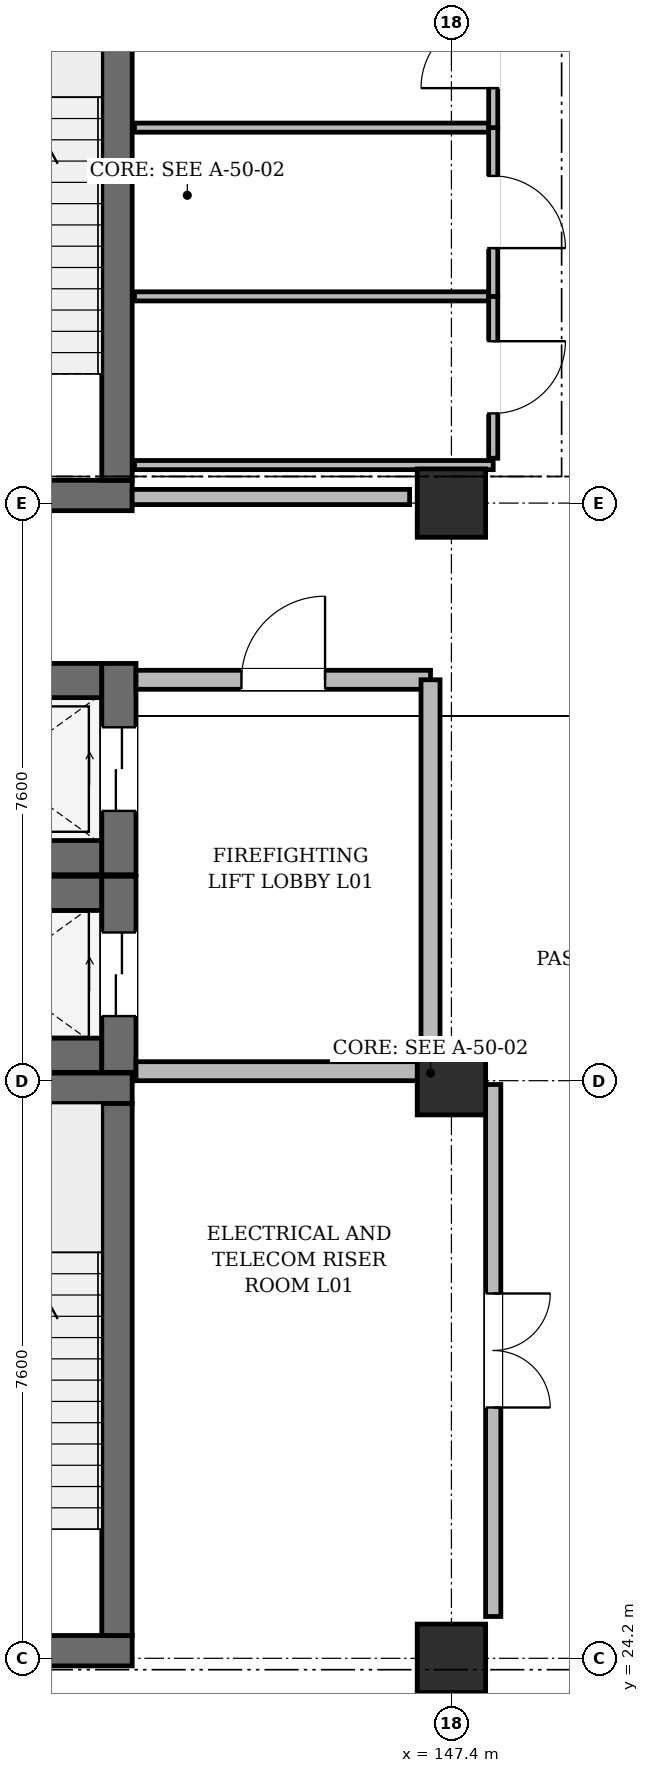
"""IFC4 building model, lengths in metres.
Left out: names, types, materials, properties, quantities, classifications, styles, units other than length and angle.
Written with IfcOpenShell. Run it as: python <this file> out.ifc"""

import sys

from ifc_helpers import new_model, si_unit, direction, frame, frame_2d, origin, origin_2d, place, context, subcontext, project, spatial, rectangle, extrude, element, fill, save


model = new_model("IFC4")
c1 = context("Model", 3, precision=1e-05, world=origin(), true_north=direction((0.0, 1.0)))
c2 = subcontext(c1, "Body", "Model", "MODEL_VIEW")
j1 = project(units=[si_unit("LENGTHUNIT", "METRE"), si_unit("PLANEANGLEUNIT", "RADIAN")], contexts=[c1])
p1 = place(None, origin())
s1 = spatial("IfcSite", under=j1, at=p1, CompositionType="ELEMENT")
p2 = place(p1, origin())
s2 = spatial("IfcBuilding", under=s1, at=p2, CompositionType="ELEMENT")
p3 = place(p2, frame((0.0, 0.0, 5.4)))
s3 = spatial("IfcBuildingStorey", under=s2, at=p3, CompositionType="ELEMENT", Elevation=5.4)
for number, where, z_axis, x_axis in (
    (1, (147.4, 24.2, 0.0), (0.0, 0.0, 1.0), (1.0, 0.0, 0.0)),
    (2, (147.4, 31.8, 0.0), (0.0, 0.0, 1.0), (1.0, 0.0, 0.0)),
    (3, (147.4, 39.4, 0.0), (0.0, 0.0, 1.0), (1.0, 0.0, 0.0)),
):
    element("IfcColumn", number, at=place(p3, frame(where, z_axis=z_axis, x_axis=x_axis)), inside=s3, PredefinedType="COLUMN", context=c2, shape_type="SweptSolid", body=[
        extrude(rectangle(XDim=0.9, YDim=0.9, at=origin_2d()), origin(), (0.0, 0.0, 1.0), 4.52),
    ])
p4 = place(p3, frame((139.4, 24.3, 0.0), z_axis=(0.0, 0.0, 1.0), x_axis=(1.0, 0.0, 0.0)))
e4 = element("IfcWall", 4, at=p4, inside=s3, PredefinedType="SHEAR", context=c2, shape_type="SweptSolid", body=[
    extrude(rectangle(XDim=3.8, YDim=0.4, at=frame_2d((1.9, 0.0))), origin(), (0.0, 0.0, 1.0), 4.52),
])
p5 = place(p4, frame((1.3, 0.0, 0.0)))
e5 = element("IfcOpeningElement", 5, at=p5, cuts=e4, PredefinedType="OPENING", context=c2, shape_type="SweptSolid", body=[
    extrude(rectangle(XDim=1.2, YDim=2.2, at=frame_2d((0.6, 1.1))), frame((0.0, 0.212, 0.0), z_axis=(0.0, -1.0, 0.0), x_axis=(1.0, 0.0, 0.0)), (0.0, 0.0, 1.0), 0.424),
])
p6 = place(p3, frame((139.4, 31.7, 0.0), z_axis=(0.0, 0.0, 1.0), x_axis=(1.0, 0.0, 0.0)))
e6 = element("IfcWall", 6, at=p6, inside=s3, PredefinedType="SHEAR", context=c2, shape_type="SweptSolid", body=[
    extrude(rectangle(XDim=3.8, YDim=0.4, at=frame_2d((1.9, 0.0))), origin(), (0.0, 0.0, 1.0), 4.52),
])
p7 = place(p3, frame((143.0, 24.5, 0.0), z_axis=(0.0, 0.0, 1.0), x_axis=(0.0, 1.0, 0.0)))
e7 = element("IfcWall", 7, at=p7, inside=s3, PredefinedType="SHEAR", context=c2, shape_type="SweptSolid", body=[
    extrude(rectangle(XDim=7.0, YDim=0.4, at=frame_2d((3.5, 0.0))), origin(), (0.0, 0.0, 1.0), 4.52),
])
p8 = place(p3, frame((139.4, 39.5, 0.0), z_axis=(0.0, 0.0, 1.0), x_axis=(1.0, 0.0, 0.0)))
e8 = element("IfcWall", 8, at=p8, inside=s3, PredefinedType="SHEAR", context=c2, shape_type="SweptSolid", body=[
    extrude(rectangle(XDim=3.8, YDim=0.4, at=frame_2d((1.9, 0.0))), origin(), (0.0, 0.0, 1.0), 4.52),
])
p9 = place(p8, frame((1.3, 0.0, 0.0)))
e9 = element("IfcOpeningElement", 9, at=p9, cuts=e8, PredefinedType="OPENING", context=c2, shape_type="SweptSolid", body=[
    extrude(rectangle(XDim=1.2, YDim=2.2, at=frame_2d((0.6, 1.1))), frame((0.0, 0.212, 0.0), z_axis=(0.0, -1.0, 0.0), x_axis=(1.0, 0.0, 0.0)), (0.0, 0.0, 1.0), 0.424),
])
p10 = place(p3, frame((143.0, 39.7, 0.0), z_axis=(0.0, 0.0, 1.0), x_axis=(0.0, 1.0, 0.0)))
e10 = element("IfcWall", 10, at=p10, inside=s3, PredefinedType="SHEAR", context=c2, shape_type="SweptSolid", body=[
    extrude(rectangle(XDim=7.0, YDim=0.4, at=frame_2d((3.5, 0.0))), origin(), (0.0, 0.0, 1.0), 4.52),
])
for number, where, z_axis, x_axis in (
    (11, (140.06, 32.135, 0.0), (0.0, 0.0, 1.0), (1.0, 0.0, 0.0)),
    (12, (140.06, 34.265, 0.0), (0.0, 0.0, 1.0), (1.0, 0.0, 0.0)),
):
    element("IfcWall", number, at=place(p3, frame(where, z_axis=z_axis, x_axis=x_axis)), inside=s3, PredefinedType="SHEAR", context=c2, shape_type="SweptSolid", body=[
        extrude(rectangle(XDim=2.74, YDim=0.45, at=frame_2d((1.37, 0.0))), origin(), (0.0, 0.0, 1.0), 4.52),
    ])
p11 = place(p3, frame((143.025, 31.91, 0.0), z_axis=(0.0, 0.0, 1.0), x_axis=(0.0, 1.0, 0.0)))
e13 = element("IfcWall", 13, at=p11, inside=s3, PredefinedType="SHEAR", context=c2, shape_type="SweptSolid", body=[
    extrude(rectangle(XDim=2.58, YDim=0.45, at=frame_2d((1.29, 0.0))), origin(), (0.0, 0.0, 1.0), 4.52),
])
p12 = place(p11, frame((0.74, 0.0, 0.0)))
e14 = element("IfcOpeningElement", 14, at=p12, cuts=e13, PredefinedType="OPENING", context=c2, shape_type="SweptSolid", body=[
    extrude(rectangle(XDim=1.1, YDim=2.2, at=frame_2d((0.55, 1.1))), frame((0.0, 0.237, 0.0), z_axis=(0.0, -1.0, 0.0), x_axis=(1.0, 0.0, 0.0)), (0.0, 0.0, 1.0), 0.474),
])
for number, where, z_axis, x_axis in (
    (15, (140.06, 34.735, 0.0), (0.0, 0.0, 1.0), (1.0, 0.0, 0.0)),
    (16, (140.06, 37.065, 0.0), (0.0, 0.0, 1.0), (1.0, 0.0, 0.0)),
):
    element("IfcWall", number, at=place(p3, frame(where, z_axis=z_axis, x_axis=x_axis)), inside=s3, PredefinedType="SHEAR", context=c2, shape_type="SweptSolid", body=[
        extrude(rectangle(XDim=2.74, YDim=0.45, at=frame_2d((1.37, 0.0))), origin(), (0.0, 0.0, 1.0), 4.52),
    ])
p13 = place(p3, frame((143.025, 34.51, 0.0), z_axis=(0.0, 0.0, 1.0), x_axis=(0.0, 1.0, 0.0)))
e17 = element("IfcWall", 17, at=p13, inside=s3, PredefinedType="SHEAR", context=c2, shape_type="SweptSolid", body=[
    extrude(rectangle(XDim=2.78, YDim=0.45, at=frame_2d((1.39, 0.0))), origin(), (0.0, 0.0, 1.0), 4.52),
])
p14 = place(p13, frame((0.84, 0.0, 0.0)))
e18 = element("IfcOpeningElement", 18, at=p14, cuts=e17, PredefinedType="OPENING", context=c2, shape_type="SweptSolid", body=[
    extrude(rectangle(XDim=1.1, YDim=2.2, at=frame_2d((0.55, 1.1))), frame((0.0, 0.237, 0.0), z_axis=(0.0, -1.0, 0.0), x_axis=(1.0, 0.0, 0.0)), (0.0, 0.0, 1.0), 0.474),
])
p15 = place(p3, frame((143.25, 37.075, 0.0), z_axis=(0.0, 0.0, 1.0), x_axis=(1.0, 0.0, 0.0)))
e19 = element("IfcWall", 19, at=p15, inside=s3, PredefinedType="SOLIDWALL", context=c2, shape_type="SweptSolid", body=[
    extrude(rectangle(XDim=3.875, YDim=0.25, at=frame_2d((1.938, 0.0))), origin(), (0.0, 0.0, 1.0), 4.405),
])
p16 = place(p15, frame((1.387, 0.0, 0.0)))
e20 = element("IfcOpeningElement", 20, at=p16, cuts=e19, PredefinedType="OPENING", context=c2, shape_type="SweptSolid", body=[
    extrude(rectangle(XDim=1.1, YDim=2.2, at=frame_2d((0.55, 1.1))), frame((0.0, 0.137, 0.0), z_axis=(0.0, -1.0, 0.0), x_axis=(1.0, 0.0, 0.0)), (0.0, 0.0, 1.0), 0.274),
])
p17 = place(p3, frame((143.25, 31.925, 0.0), z_axis=(0.0, 0.0, 1.0), x_axis=(1.0, 0.0, 0.0)))
e21 = element("IfcWall", 21, at=p17, inside=s3, PredefinedType="SOLIDWALL", context=c2, shape_type="SweptSolid", body=[
    extrude(rectangle(XDim=3.875, YDim=0.25, at=frame_2d((1.938, 0.0))), origin(), (0.0, 0.0, 1.0), 3.755),
])
p18 = place(p3, frame((147.125, 31.925, 0.0), z_axis=(0.0, 0.0, 1.0), x_axis=(0.0, 1.0, 0.0)))
e22 = element("IfcWall", 22, at=p18, inside=s3, PredefinedType="SOLIDWALL", context=c2, shape_type="SweptSolid", body=[
    extrude(rectangle(XDim=5.15, YDim=0.25, at=frame_2d((2.575, 0.0))), origin(), (0.0, 0.0, 1.0), 3.755),
])
p19 = place(p3, frame((143.23, 39.9, 0.0), z_axis=(0.0, 0.0, 1.0), x_axis=(1.0, 0.0, 0.0)))
e23 = element("IfcWall", 23, at=p19, inside=s3, PredefinedType="PARTITIONING", context=c2, shape_type="SweptSolid", body=[
    extrude(rectangle(XDim=4.72, YDim=0.12, at=frame_2d((2.36, 0.0))), origin(), (0.0, 0.0, 1.0), 4.405),
])
p20 = place(p3, frame((147.95, 31.75, 0.0), z_axis=(0.0, 0.0, 1.0), x_axis=(0.0, -1.0, 0.0)))
e24 = element("IfcWall", 24, at=p20, inside=s3, PredefinedType="PARTITIONING", context=c2, shape_type="SweptSolid", body=[
    extrude(rectangle(XDim=7.0, YDim=0.2, at=frame_2d((3.5, 0.0))), origin(), (0.0, 0.0, 1.0), 4.405),
])
p21 = place(p20, frame((2.75, 0.0, 0.0)))
e25 = element("IfcOpeningElement", 25, at=p21, cuts=e24, PredefinedType="OPENING", context=c2, shape_type="SweptSolid", body=[
    extrude(rectangle(XDim=1.5, YDim=2.2, at=frame_2d((0.75, 1.1))), frame((0.0, 0.112, 0.0), z_axis=(0.0, -1.0, 0.0), x_axis=(1.0, 0.0, 0.0)), (0.0, 0.0, 1.0), 0.224),
])
p22 = place(p3, frame((143.23, 42.12, 0.0), z_axis=(0.0, 0.0, 1.0), x_axis=(1.0, 0.0, 0.0)))
e26 = element("IfcWall", 26, at=p22, inside=s3, PredefinedType="PARTITIONING", context=c2, shape_type="SweptSolid", body=[
    extrude(rectangle(XDim=4.72, YDim=0.12, at=frame_2d((2.36, 0.0))), origin(), (0.0, 0.0, 1.0), 3.995),
])
p23 = place(p3, frame((147.95, 42.12, 0.0), z_axis=(0.0, 0.0, 1.0), x_axis=(0.0, -1.0, 0.0)))
e27 = element("IfcWall", 27, at=p23, inside=s3, PredefinedType="PARTITIONING", context=c2, shape_type="SweptSolid", body=[
    extrude(rectangle(XDim=2.13, YDim=0.12, at=frame_2d((1.065, 0.0))), origin(), (0.0, 0.0, 1.0), 4.405),
])
p24 = place(p23, frame((0.59, 0.0, 0.0)))
e28 = element("IfcOpeningElement", 28, at=p24, cuts=e27, PredefinedType="OPENING", context=c2, shape_type="SweptSolid", body=[
    extrude(rectangle(XDim=0.95, YDim=2.15, at=frame_2d((0.475, 1.075))), frame((0.0, 0.072, 0.0), z_axis=(0.0, -1.0, 0.0), x_axis=(1.0, 0.0, 0.0)), (0.0, 0.0, 1.0), 0.144),
])
p25 = place(p3, frame((143.23, 44.34, 0.0), z_axis=(0.0, 0.0, 1.0), x_axis=(1.0, 0.0, 0.0)))
e29 = element("IfcWall", 29, at=p25, inside=s3, PredefinedType="PARTITIONING", context=c2, shape_type="SweptSolid", body=[
    extrude(rectangle(XDim=4.72, YDim=0.12, at=frame_2d((2.36, 0.0))), origin(), (0.0, 0.0, 1.0), 3.945),
])
p26 = place(p3, frame((147.95, 44.34, 0.0), z_axis=(0.0, 0.0, 1.0), x_axis=(0.0, -1.0, 0.0)))
e30 = element("IfcWall", 30, at=p26, inside=s3, PredefinedType="PARTITIONING", context=c2, shape_type="SweptSolid", body=[
    extrude(rectangle(XDim=2.22, YDim=0.12, at=frame_2d((1.11, 0.0))), origin(), (0.0, 0.0, 1.0), 4.405),
])
p27 = place(p26, frame((0.635, 0.0, 0.0)))
e31 = element("IfcOpeningElement", 31, at=p27, cuts=e30, PredefinedType="OPENING", context=c2, shape_type="SweptSolid", body=[
    extrude(rectangle(XDim=0.95, YDim=2.15, at=frame_2d((0.475, 1.075))), frame((0.0, 0.072, 0.0), z_axis=(0.0, -1.0, 0.0), x_axis=(1.0, 0.0, 0.0)), (0.0, 0.0, 1.0), 0.144),
])
p28 = place(p3, frame((147.95, 46.33, 0.0), z_axis=(0.0, 0.0, 1.0), x_axis=(0.0, -1.0, 0.0)))
e32 = element("IfcWall", 32, at=p28, inside=s3, PredefinedType="PARTITIONING", context=c2, shape_type="SweptSolid", body=[
    extrude(rectangle(XDim=1.99, YDim=0.12, at=frame_2d((0.995, 0.0))), origin(), (0.0, 0.0, 1.0), 4.405),
])
p29 = place(p28, frame((0.52, 0.0, 0.0)))
e33 = element("IfcOpeningElement", 33, at=p29, cuts=e32, PredefinedType="OPENING", context=c2, shape_type="SweptSolid", body=[
    extrude(rectangle(XDim=0.95, YDim=2.15, at=frame_2d((0.475, 1.075))), frame((0.0, 0.072, 0.0), z_axis=(0.0, -1.0, 0.0), x_axis=(1.0, 0.0, 0.0)), (0.0, 0.0, 1.0), 0.144),
])
p30 = place(p3, frame((143.2, 39.48, 0.0), z_axis=(0.0, 0.0, 1.0), x_axis=(1.0, 0.0, 0.0)))
e34 = element("IfcWall", 34, at=p30, inside=s3, PredefinedType="PARTITIONING", context=c2, shape_type="SweptSolid", body=[
    extrude(rectangle(XDim=3.65, YDim=0.2, at=frame_2d((1.825, 0.0))), origin(), (0.0, 0.0, 1.0), 3.755),
])
p31 = place(p12, origin())
e35 = element("IfcDoor", 35, at=p31, inside=s3, OperationType="DOUBLE_DOOR_SLIDING", PredefinedType="DOOR", context=c2, shape_type="SweptSolid", body=[
    extrude(rectangle(XDim=1.1, YDim=2.2, at=frame_2d((0.55, 1.1))), frame((0.0, 0.025, 0.0), z_axis=(0.0, -1.0, 0.0), x_axis=(1.0, 0.0, 0.0)), (0.0, 0.0, 1.0), 0.05),
])
fill(e14, e35)
p32 = place(p14, origin())
e36 = element("IfcDoor", 36, at=p32, inside=s3, OperationType="DOUBLE_DOOR_SLIDING", PredefinedType="DOOR", context=c2, shape_type="SweptSolid", body=[
    extrude(rectangle(XDim=1.1, YDim=2.2, at=frame_2d((0.55, 1.1))), frame((0.0, 0.025, 0.0), z_axis=(0.0, -1.0, 0.0), x_axis=(1.0, 0.0, 0.0)), (0.0, 0.0, 1.0), 0.05),
])
fill(e18, e36)
p33 = place(p16, origin())
e37 = element("IfcDoor", 37, at=p33, inside=s3, OperationType="SINGLE_SWING_RIGHT", PredefinedType="DOOR", context=c2, shape_type="SweptSolid", body=[
    extrude(rectangle(XDim=1.1, YDim=2.2, at=frame_2d((0.55, 1.1))), frame((0.0, 0.025, 0.0), z_axis=(0.0, -1.0, 0.0), x_axis=(1.0, 0.0, 0.0)), (0.0, 0.0, 1.0), 0.05),
])
fill(e20, e37)
p34 = place(p21, origin())
e38 = element("IfcDoor", 38, at=p34, inside=s3, OperationType="DOUBLE_DOOR_SINGLE_SWING", PredefinedType="DOOR", context=c2, shape_type="SweptSolid", body=[
    extrude(rectangle(XDim=1.5, YDim=2.2, at=frame_2d((0.75, 1.1))), frame((0.0, 0.025, 0.0), z_axis=(0.0, -1.0, 0.0), x_axis=(1.0, 0.0, 0.0)), (0.0, 0.0, 1.0), 0.05),
])
fill(e25, e38)
p35 = place(p24, origin())
e39 = element("IfcDoor", 39, at=p35, inside=s3, OperationType="SINGLE_SWING_LEFT", PredefinedType="DOOR", context=c2, shape_type="SweptSolid", body=[
    extrude(rectangle(XDim=0.95, YDim=2.15, at=frame_2d((0.475, 1.075))), frame((0.0, 0.025, 0.0), z_axis=(0.0, -1.0, 0.0), x_axis=(1.0, 0.0, 0.0)), (0.0, 0.0, 1.0), 0.05),
])
fill(e28, e39)
p36 = place(p27, origin())
e40 = element("IfcDoor", 40, at=p36, inside=s3, OperationType="SINGLE_SWING_RIGHT", PredefinedType="DOOR", context=c2, shape_type="SweptSolid", body=[
    extrude(rectangle(XDim=0.95, YDim=2.15, at=frame_2d((0.475, 1.075))), frame((0.0, 0.025, 0.0), z_axis=(0.0, -1.0, 0.0), x_axis=(1.0, 0.0, 0.0)), (0.0, 0.0, 1.0), 0.05),
])
fill(e31, e40)
p37 = place(p29, frame((0.95, 0.0, 0.0), z_axis=(0.0, 0.0, 1.0), x_axis=(-1.0, 0.0, 0.0)))
e41 = element("IfcDoor", 41, at=p37, inside=s3, OperationType="SINGLE_SWING_LEFT", PredefinedType="DOOR", context=c2, shape_type="SweptSolid", body=[
    extrude(rectangle(XDim=0.95, YDim=2.15, at=frame_2d((0.475, 1.075))), frame((0.0, 0.025, 0.0), z_axis=(0.0, -1.0, 0.0), x_axis=(1.0, 0.0, 0.0)), (0.0, 0.0, 1.0), 0.05),
])
fill(e33, e41)
save(model, sys.argv[1])
